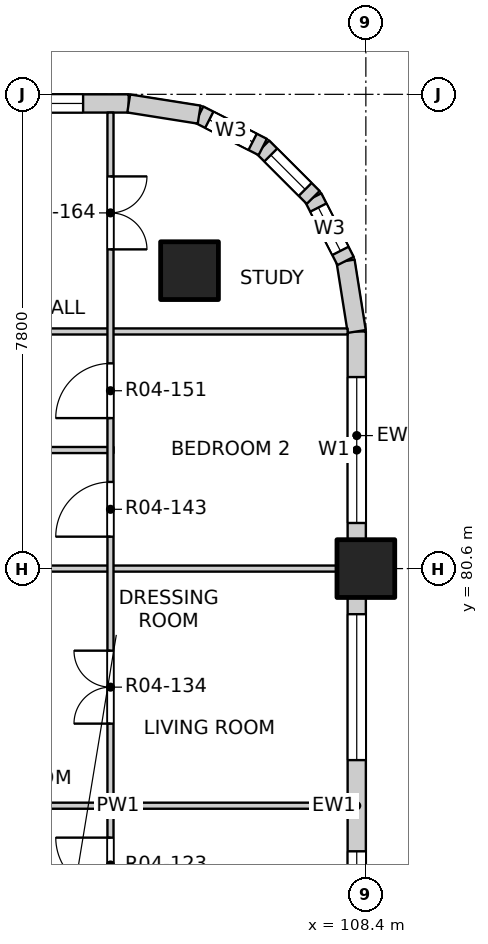
"""IFC4 building model, lengths in metres.
Left out: names, types, materials, properties, quantities, classifications, styles, units other than length and angle.
Written with IfcOpenShell. Run it as: python <this file> out.ifc"""

import sys

from ifc_helpers import new_model, si_unit, direction, frame, frame_2d, origin, origin_2d, place, context, subcontext, project, spatial, rectangle, extrude, element, fill, save


model = new_model("IFC4")
c1 = context("Model", 3, precision=1e-05, world=origin(), true_north=direction((0.0, 1.0)))
c2 = subcontext(c1, "Body", "Model", "MODEL_VIEW")
j1 = project(units=[si_unit("LENGTHUNIT", "METRE"), si_unit("PLANEANGLEUNIT", "RADIAN")], contexts=[c1])
p1 = place(None, origin())
s1 = spatial("IfcSite", under=j1, at=p1, CompositionType="ELEMENT")
p2 = place(p1, origin())
s2 = spatial("IfcBuilding", under=s1, at=p2, CompositionType="ELEMENT")
p3 = place(p2, frame((0.0, 0.0, 58.0)))
s3 = spatial("IfcBuildingStorey", under=s2, at=p3, CompositionType="ELEMENT", Elevation=58.0)
for number, where, z_axis, x_axis in (
    (1, (105.5, 85.5, -0.25), (0.0, 0.0, 1.0), (1.0, 0.0, 0.0)),
    (2, (108.4, 80.6, -0.25), (0.0, 0.0, 1.0), (1.0, 0.0, 0.0)),
):
    element("IfcColumn", number, at=place(p3, frame(where, z_axis=z_axis, x_axis=x_axis)), inside=s3, PredefinedType="COLUMN", context=c2, shape_type="SweptSolid", body=[
        extrude(rectangle(XDim=0.95, YDim=0.95, at=origin_2d()), origin(), (0.0, 0.0, 1.0), 3.4),
    ])
p4 = place(p3, frame((108.25, 73.275, 0.0), z_axis=(0.0, 0.0, 1.0), x_axis=(0.0, 1.0, 0.0)))
e3 = element("IfcWall", 3, at=p4, inside=s3, PredefinedType="SOLIDWALL", context=c2, shape_type="SweptSolid", body=[
    extrude(rectangle(XDim=6.85, YDim=0.3, at=frame_2d((3.425, 0.0))), origin(), (0.0, 0.0, 1.0), 2.7),
])
p5 = place(p4, frame((0.275, 0.0, 0.9)))
e4 = element("IfcOpeningElement", 4, at=p5, cuts=e3, PredefinedType="OPENING", context=c2, shape_type="SweptSolid", body=[
    extrude(rectangle(XDim=2.4, YDim=1.8, at=frame_2d((1.2, 0.9))), frame((0.0, 0.16, 0.0), z_axis=(0.0, -1.0, 0.0), x_axis=(1.0, 0.0, 0.0)), (0.0, 0.0, 1.0), 0.32),
])
p6 = place(p4, frame((4.175, 0.0, 0.9)))
e5 = element("IfcOpeningElement", 5, at=p6, cuts=e3, PredefinedType="OPENING", context=c2, shape_type="SweptSolid", body=[
    extrude(rectangle(XDim=2.4, YDim=1.8, at=frame_2d((1.2, 0.9))), frame((0.0, 0.16, 0.0), z_axis=(0.0, -1.0, 0.0), x_axis=(1.0, 0.0, 0.0)), (0.0, 0.0, 1.0), 0.32),
])
p7 = place(p3, frame((108.25, 81.075, 0.0), z_axis=(0.0, 0.0, 1.0), x_axis=(0.0, 1.0, 0.0)))
e6 = element("IfcWall", 6, at=p7, inside=s3, PredefinedType="SOLIDWALL", context=c2, shape_type="SweptSolid", body=[
    extrude(rectangle(XDim=3.425, YDim=0.3, at=frame_2d((1.712, 0.0))), origin(), (0.0, 0.0, 1.0), 2.7),
])
p8 = place(p7, frame((0.275, 0.0, 0.9)))
e7 = element("IfcOpeningElement", 7, at=p8, cuts=e6, PredefinedType="OPENING", context=c2, shape_type="SweptSolid", body=[
    extrude(rectangle(XDim=2.4, YDim=1.8, at=frame_2d((1.2, 0.9))), frame((0.0, 0.16, 0.0), z_axis=(0.0, -1.0, 0.0), x_axis=(1.0, 0.0, 0.0)), (0.0, 0.0, 1.0), 0.32),
])
p9 = place(p3, frame((101.075, 88.25, 0.0), z_axis=(0.0, 0.0, 1.0), x_axis=(1.0, 0.0, 0.0)))
e8 = element("IfcWall", 8, at=p9, inside=s3, PredefinedType="SOLIDWALL", context=c2, shape_type="SweptSolid", body=[
    extrude(rectangle(XDim=3.425, YDim=0.3, at=frame_2d((1.712, 0.0))), origin(), (0.0, 0.0, 1.0), 2.7),
])
p10 = place(p9, frame((0.275, 0.0, 0.9)))
e9 = element("IfcOpeningElement", 9, at=p10, cuts=e8, PredefinedType="OPENING", context=c2, shape_type="SweptSolid", body=[
    extrude(rectangle(XDim=2.4, YDim=1.8, at=frame_2d((1.2, 0.9))), frame((0.0, 0.16, 0.0), z_axis=(0.0, -1.0, 0.0), x_axis=(1.0, 0.0, 0.0)), (0.0, 0.0, 1.0), 0.32),
])
p11 = place(p3, frame((108.25, 84.5, 0.0), z_axis=(0.0, 0.0, 1.0), x_axis=(-0.156496880861, 0.987678452879, 0.0)))
e10 = element("IfcWall", 10, at=p11, inside=s3, PredefinedType="SOLIDWALL", context=c2, shape_type="SweptSolid", body=[
    extrude(rectangle(XDim=1.173, YDim=0.3, at=frame_2d((0.586, 0.0))), origin(), (0.0, 0.0, 1.0), 2.7),
])
p12 = place(p3, frame((108.066, 85.659, 0.0), z_axis=(0.0, 0.0, 1.0), x_axis=(-0.454025524128, 0.890988677504, 0.0)))
e11 = element("IfcWall", 11, at=p12, inside=s3, PredefinedType="SOLIDWALL", context=c2, shape_type="SweptSolid", body=[
    extrude(rectangle(XDim=1.173, YDim=0.3, at=frame_2d((0.587, 0.0))), origin(), (0.0, 0.0, 1.0), 2.7),
])
p13 = place(p12, frame((0.187, 0.0, 0.9)))
e12 = element("IfcOpeningElement", 12, at=p13, cuts=e11, PredefinedType="OPENING", context=c2, shape_type="SweptSolid", body=[
    extrude(rectangle(XDim=0.8, YDim=1.2, at=frame_2d((0.4, 0.6))), frame((0.0, 0.16, 0.0), z_axis=(0.0, -1.0, 0.0), x_axis=(1.0, 0.0, 0.0)), (0.0, 0.0, 1.0), 0.32),
])
p14 = place(p3, frame((107.534, 86.704, 0.0), z_axis=(0.0, 0.0, 1.0), x_axis=(-0.707106781187, 0.707106781187, 0.0)))
e13 = element("IfcWall", 13, at=p14, inside=s3, PredefinedType="SOLIDWALL", context=c2, shape_type="SweptSolid", body=[
    extrude(rectangle(XDim=1.173, YDim=0.3, at=frame_2d((0.586, 0.0))), origin(), (0.0, 0.0, 1.0), 2.7),
])
p15 = place(p14, frame((0.187, 0.0, 0.9)))
e14 = element("IfcOpeningElement", 14, at=p15, cuts=e13, PredefinedType="OPENING", context=c2, shape_type="SweptSolid", body=[
    extrude(rectangle(XDim=0.8, YDim=1.2, at=frame_2d((0.4, 0.6))), frame((0.0, 0.16, 0.0), z_axis=(0.0, -1.0, 0.0), x_axis=(1.0, 0.0, 0.0)), (0.0, 0.0, 1.0), 0.32),
])
p16 = place(p3, frame((106.704, 87.534, 0.0), z_axis=(0.0, 0.0, 1.0), x_axis=(-0.890988677504, 0.454025524128, 0.0)))
e15 = element("IfcWall", 15, at=p16, inside=s3, PredefinedType="SOLIDWALL", context=c2, shape_type="SweptSolid", body=[
    extrude(rectangle(XDim=1.173, YDim=0.3, at=frame_2d((0.587, 0.0))), origin(), (0.0, 0.0, 1.0), 2.7),
])
p17 = place(p16, frame((0.187, 0.0, 0.9)))
e16 = element("IfcOpeningElement", 16, at=p17, cuts=e15, PredefinedType="OPENING", context=c2, shape_type="SweptSolid", body=[
    extrude(rectangle(XDim=0.8, YDim=1.2, at=frame_2d((0.4, 0.6))), frame((0.0, 0.16, 0.0), z_axis=(0.0, -1.0, 0.0), x_axis=(1.0, 0.0, 0.0)), (0.0, 0.0, 1.0), 0.32),
])
p18 = place(p3, frame((105.659, 88.066, 0.0), z_axis=(0.0, 0.0, 1.0), x_axis=(-0.987678452879, 0.156496880861, 0.0)))
e17 = element("IfcWall", 17, at=p18, inside=s3, PredefinedType="SOLIDWALL", context=c2, shape_type="SweptSolid", body=[
    extrude(rectangle(XDim=1.173, YDim=0.3, at=frame_2d((0.586, 0.0))), origin(), (0.0, 0.0, 1.0), 2.7),
])
p19 = place(p3, frame((100.55, 76.7, 0.0), z_axis=(0.0, 0.0, 1.0), x_axis=(1.0, 0.0, 0.0)))
e18 = element("IfcWall", 18, at=p19, inside=s3, PredefinedType="PARTITIONING", context=c2, shape_type="SweptSolid", body=[
    extrude(rectangle(XDim=7.55, YDim=0.1, at=frame_2d((3.775, 0.0))), origin(), (0.0, 0.0, 1.0), 3.15),
])
p20 = place(p3, frame((100.55, 80.6, 0.0), z_axis=(0.0, 0.0, 1.0), x_axis=(1.0, 0.0, 0.0)))
e19 = element("IfcWall", 19, at=p20, inside=s3, PredefinedType="PARTITIONING", context=c2, shape_type="SweptSolid", body=[
    extrude(rectangle(XDim=7.55, YDim=0.1, at=frame_2d((3.775, 0.0))), origin(), (0.0, 0.0, 1.0), 2.55),
])
p21 = place(p3, frame((100.55, 82.55, 0.0), z_axis=(0.0, 0.0, 1.0), x_axis=(1.0, 0.0, 0.0)))
e20 = element("IfcWall", 20, at=p21, inside=s3, PredefinedType="PARTITIONING", context=c2, shape_type="SweptSolid", body=[
    extrude(rectangle(XDim=3.7, YDim=0.1, at=frame_2d((1.85, 0.0))), origin(), (0.0, 0.0, 1.0), 3.15),
])
p22 = place(p3, frame((96.6, 84.5, 0.0), z_axis=(0.0, 0.0, 1.0), x_axis=(1.0, 0.0, 0.0)))
e21 = element("IfcWall", 21, at=p22, inside=s3, PredefinedType="PARTITIONING", context=c2, shape_type="SweptSolid", body=[
    extrude(rectangle(XDim=11.5, YDim=0.1, at=frame_2d((5.75, 0.0))), origin(), (0.0, 0.0, 1.0), 3.15),
])
p23 = place(p22, frame((2.635, 0.0, 0.0)))
e22 = element("IfcOpeningElement", 22, at=p23, cuts=e21, PredefinedType="OPENING", context=c2, shape_type="SweptSolid", body=[
    extrude(rectangle(XDim=0.9, YDim=2.1, at=frame_2d((0.45, 1.05))), frame((0.0, 0.06, 0.0), z_axis=(0.0, -1.0, 0.0), x_axis=(1.0, 0.0, 0.0)), (0.0, 0.0, 1.0), 0.12),
])
p24 = place(p3, frame((104.2, 41.9, 0.0), z_axis=(0.0, 0.0, 1.0), x_axis=(0.0, 1.0, 0.0)))
e23 = element("IfcWall", 23, at=p24, inside=s3, PredefinedType="PARTITIONING", context=c2, shape_type="SweptSolid", body=[
    extrude(rectangle(XDim=46.2, YDim=0.1, at=frame_2d((23.1, 0.0))), origin(), (0.0, 0.0, 1.0), 3.15),
])
p25 = place(p24, frame((1.05, 0.0, 0.0)))
e24 = element("IfcOpeningElement", 24, at=p25, cuts=e23, PredefinedType="OPENING", context=c2, shape_type="SweptSolid", body=[
    extrude(rectangle(XDim=1.2, YDim=2.1, at=frame_2d((0.6, 1.05))), frame((0.0, 0.06, 0.0), z_axis=(0.0, -1.0, 0.0), x_axis=(1.0, 0.0, 0.0)), (0.0, 0.0, 1.0), 0.12),
])
p26 = place(p24, frame((4.125, 0.0, 0.0)))
e25 = element("IfcOpeningElement", 25, at=p26, cuts=e23, PredefinedType="OPENING", context=c2, shape_type="SweptSolid", body=[
    extrude(rectangle(XDim=0.9, YDim=2.1, at=frame_2d((0.45, 1.05))), frame((0.0, 0.06, 0.0), z_axis=(0.0, -1.0, 0.0), x_axis=(1.0, 0.0, 0.0)), (0.0, 0.0, 1.0), 0.12),
])
p27 = place(p24, frame((6.075, 0.0, 0.0)))
e26 = element("IfcOpeningElement", 26, at=p27, cuts=e23, PredefinedType="OPENING", context=c2, shape_type="SweptSolid", body=[
    extrude(rectangle(XDim=0.9, YDim=2.1, at=frame_2d((0.45, 1.05))), frame((0.0, 0.06, 0.0), z_axis=(0.0, -1.0, 0.0), x_axis=(1.0, 0.0, 0.0)), (0.0, 0.0, 1.0), 0.12),
])
p28 = place(p24, frame((8.025, 0.0, 0.0)))
e27 = element("IfcOpeningElement", 27, at=p28, cuts=e23, PredefinedType="OPENING", context=c2, shape_type="SweptSolid", body=[
    extrude(rectangle(XDim=0.9, YDim=2.1, at=frame_2d((0.45, 1.05))), frame((0.0, 0.06, 0.0), z_axis=(0.0, -1.0, 0.0), x_axis=(1.0, 0.0, 0.0)), (0.0, 0.0, 1.0), 0.12),
])
p29 = place(p24, frame((9.975, 0.0, 0.0)))
e28 = element("IfcOpeningElement", 28, at=p29, cuts=e23, PredefinedType="OPENING", context=c2, shape_type="SweptSolid", body=[
    extrude(rectangle(XDim=0.9, YDim=2.1, at=frame_2d((0.45, 1.05))), frame((0.0, 0.06, 0.0), z_axis=(0.0, -1.0, 0.0), x_axis=(1.0, 0.0, 0.0)), (0.0, 0.0, 1.0), 0.12),
])
p30 = place(p24, frame((12.75, 0.0, 0.0)))
e29 = element("IfcOpeningElement", 29, at=p30, cuts=e23, PredefinedType="OPENING", context=c2, shape_type="SweptSolid", body=[
    extrude(rectangle(XDim=1.2, YDim=2.1, at=frame_2d((0.6, 1.05))), frame((0.0, 0.06, 0.0), z_axis=(0.0, -1.0, 0.0), x_axis=(1.0, 0.0, 0.0)), (0.0, 0.0, 1.0), 0.12),
])
p31 = place(p24, frame((15.825, 0.0, 0.0)))
e30 = element("IfcOpeningElement", 30, at=p31, cuts=e23, PredefinedType="OPENING", context=c2, shape_type="SweptSolid", body=[
    extrude(rectangle(XDim=0.9, YDim=2.1, at=frame_2d((0.45, 1.05))), frame((0.0, 0.06, 0.0), z_axis=(0.0, -1.0, 0.0), x_axis=(1.0, 0.0, 0.0)), (0.0, 0.0, 1.0), 0.12),
])
p32 = place(p24, frame((17.775, 0.0, 0.0)))
e31 = element("IfcOpeningElement", 31, at=p32, cuts=e23, PredefinedType="OPENING", context=c2, shape_type="SweptSolid", body=[
    extrude(rectangle(XDim=0.9, YDim=2.1, at=frame_2d((0.45, 1.05))), frame((0.0, 0.06, 0.0), z_axis=(0.0, -1.0, 0.0), x_axis=(1.0, 0.0, 0.0)), (0.0, 0.0, 1.0), 0.12),
])
p33 = place(p24, frame((20.55, 0.0, 0.0)))
e32 = element("IfcOpeningElement", 32, at=p33, cuts=e23, PredefinedType="OPENING", context=c2, shape_type="SweptSolid", body=[
    extrude(rectangle(XDim=1.2, YDim=2.1, at=frame_2d((0.6, 1.05))), frame((0.0, 0.06, 0.0), z_axis=(0.0, -1.0, 0.0), x_axis=(1.0, 0.0, 0.0)), (0.0, 0.0, 1.0), 0.12),
])
p34 = place(p24, frame((24.45, 0.0, 0.0)))
e33 = element("IfcOpeningElement", 33, at=p34, cuts=e23, PredefinedType="OPENING", context=c2, shape_type="SweptSolid", body=[
    extrude(rectangle(XDim=1.2, YDim=2.1, at=frame_2d((0.6, 1.05))), frame((0.0, 0.06, 0.0), z_axis=(0.0, -1.0, 0.0), x_axis=(1.0, 0.0, 0.0)), (0.0, 0.0, 1.0), 0.12),
])
p35 = place(p24, frame((27.525, 0.0, 0.0)))
e34 = element("IfcOpeningElement", 34, at=p35, cuts=e23, PredefinedType="OPENING", context=c2, shape_type="SweptSolid", body=[
    extrude(rectangle(XDim=0.9, YDim=2.1, at=frame_2d((0.45, 1.05))), frame((0.0, 0.06, 0.0), z_axis=(0.0, -1.0, 0.0), x_axis=(1.0, 0.0, 0.0)), (0.0, 0.0, 1.0), 0.12),
])
p36 = place(p24, frame((29.475, 0.0, 0.0)))
e35 = element("IfcOpeningElement", 35, at=p36, cuts=e23, PredefinedType="OPENING", context=c2, shape_type="SweptSolid", body=[
    extrude(rectangle(XDim=0.9, YDim=2.1, at=frame_2d((0.45, 1.05))), frame((0.0, 0.06, 0.0), z_axis=(0.0, -1.0, 0.0), x_axis=(1.0, 0.0, 0.0)), (0.0, 0.0, 1.0), 0.12),
])
p37 = place(p24, frame((31.425, 0.0, 0.0)))
e36 = element("IfcOpeningElement", 36, at=p37, cuts=e23, PredefinedType="OPENING", context=c2, shape_type="SweptSolid", body=[
    extrude(rectangle(XDim=0.9, YDim=2.1, at=frame_2d((0.45, 1.05))), frame((0.0, 0.06, 0.0), z_axis=(0.0, -1.0, 0.0), x_axis=(1.0, 0.0, 0.0)), (0.0, 0.0, 1.0), 0.12),
])
p38 = place(p24, frame((33.375, 0.0, 0.0)))
e37 = element("IfcOpeningElement", 37, at=p38, cuts=e23, PredefinedType="OPENING", context=c2, shape_type="SweptSolid", body=[
    extrude(rectangle(XDim=0.9, YDim=2.1, at=frame_2d((0.45, 1.05))), frame((0.0, 0.06, 0.0), z_axis=(0.0, -1.0, 0.0), x_axis=(1.0, 0.0, 0.0)), (0.0, 0.0, 1.0), 0.12),
])
p39 = place(p24, frame((36.15, 0.0, 0.0)))
e38 = element("IfcOpeningElement", 38, at=p39, cuts=e23, PredefinedType="OPENING", context=c2, shape_type="SweptSolid", body=[
    extrude(rectangle(XDim=1.2, YDim=2.1, at=frame_2d((0.6, 1.05))), frame((0.0, 0.06, 0.0), z_axis=(0.0, -1.0, 0.0), x_axis=(1.0, 0.0, 0.0)), (0.0, 0.0, 1.0), 0.12),
])
p40 = place(p24, frame((39.225, 0.0, 0.0)))
e39 = element("IfcOpeningElement", 39, at=p40, cuts=e23, PredefinedType="OPENING", context=c2, shape_type="SweptSolid", body=[
    extrude(rectangle(XDim=0.9, YDim=2.1, at=frame_2d((0.45, 1.05))), frame((0.0, 0.06, 0.0), z_axis=(0.0, -1.0, 0.0), x_axis=(1.0, 0.0, 0.0)), (0.0, 0.0, 1.0), 0.12),
])
p41 = place(p24, frame((41.175, 0.0, 0.0)))
e40 = element("IfcOpeningElement", 40, at=p41, cuts=e23, PredefinedType="OPENING", context=c2, shape_type="SweptSolid", body=[
    extrude(rectangle(XDim=0.9, YDim=2.1, at=frame_2d((0.45, 1.05))), frame((0.0, 0.06, 0.0), z_axis=(0.0, -1.0, 0.0), x_axis=(1.0, 0.0, 0.0)), (0.0, 0.0, 1.0), 0.12),
])
p42 = place(p24, frame((43.95, 0.0, 0.0)))
e41 = element("IfcOpeningElement", 41, at=p42, cuts=e23, PredefinedType="OPENING", context=c2, shape_type="SweptSolid", body=[
    extrude(rectangle(XDim=1.2, YDim=2.1, at=frame_2d((0.6, 1.05))), frame((0.0, 0.06, 0.0), z_axis=(0.0, -1.0, 0.0), x_axis=(1.0, 0.0, 0.0)), (0.0, 0.0, 1.0), 0.12),
])
p43 = place(p5, origin())
e42 = element("IfcWindow", 42, at=p43, inside=s3, PartitioningType="DOUBLE_PANEL_VERTICAL", PredefinedType="WINDOW", context=c2, shape_type="SweptSolid", body=[
    extrude(rectangle(XDim=2.4, YDim=1.8, at=frame_2d((1.2, 0.9))), frame((0.0, 0.03, 0.0), z_axis=(0.0, -1.0, 0.0), x_axis=(1.0, 0.0, 0.0)), (0.0, 0.0, 1.0), 0.06),
])
fill(e4, e42)
p44 = place(p6, origin())
e43 = element("IfcWindow", 43, at=p44, inside=s3, PartitioningType="DOUBLE_PANEL_VERTICAL", PredefinedType="WINDOW", context=c2, shape_type="SweptSolid", body=[
    extrude(rectangle(XDim=2.4, YDim=1.8, at=frame_2d((1.2, 0.9))), frame((0.0, 0.03, 0.0), z_axis=(0.0, -1.0, 0.0), x_axis=(1.0, 0.0, 0.0)), (0.0, 0.0, 1.0), 0.06),
])
fill(e5, e43)
p45 = place(p8, origin())
e44 = element("IfcWindow", 44, at=p45, inside=s3, PartitioningType="DOUBLE_PANEL_VERTICAL", PredefinedType="WINDOW", context=c2, shape_type="SweptSolid", body=[
    extrude(rectangle(XDim=2.4, YDim=1.8, at=frame_2d((1.2, 0.9))), frame((0.0, 0.03, 0.0), z_axis=(0.0, -1.0, 0.0), x_axis=(1.0, 0.0, 0.0)), (0.0, 0.0, 1.0), 0.06),
])
fill(e7, e44)
p46 = place(p10, origin())
e45 = element("IfcWindow", 45, at=p46, inside=s3, PartitioningType="DOUBLE_PANEL_VERTICAL", PredefinedType="WINDOW", context=c2, shape_type="SweptSolid", body=[
    extrude(rectangle(XDim=2.4, YDim=1.8, at=frame_2d((1.2, 0.9))), frame((0.0, 0.03, 0.0), z_axis=(0.0, -1.0, 0.0), x_axis=(1.0, 0.0, 0.0)), (0.0, 0.0, 1.0), 0.06),
])
fill(e9, e45)
p47 = place(p13, origin())
e46 = element("IfcWindow", 46, at=p47, inside=s3, PartitioningType="SINGLE_PANEL", PredefinedType="WINDOW", context=c2, shape_type="SweptSolid", body=[
    extrude(rectangle(XDim=0.8, YDim=1.2, at=frame_2d((0.4, 0.6))), frame((0.0, 0.03, 0.0), z_axis=(0.0, -1.0, 0.0), x_axis=(1.0, 0.0, 0.0)), (0.0, 0.0, 1.0), 0.06),
])
fill(e12, e46)
p48 = place(p15, origin())
e47 = element("IfcWindow", 47, at=p48, inside=s3, PartitioningType="SINGLE_PANEL", PredefinedType="WINDOW", context=c2, shape_type="SweptSolid", body=[
    extrude(rectangle(XDim=0.8, YDim=1.2, at=frame_2d((0.4, 0.6))), frame((0.0, 0.03, 0.0), z_axis=(0.0, -1.0, 0.0), x_axis=(1.0, 0.0, 0.0)), (0.0, 0.0, 1.0), 0.06),
])
fill(e14, e47)
p49 = place(p17, origin())
e48 = element("IfcWindow", 48, at=p49, inside=s3, PartitioningType="SINGLE_PANEL", PredefinedType="WINDOW", context=c2, shape_type="SweptSolid", body=[
    extrude(rectangle(XDim=0.8, YDim=1.2, at=frame_2d((0.4, 0.6))), frame((0.0, 0.03, 0.0), z_axis=(0.0, -1.0, 0.0), x_axis=(1.0, 0.0, 0.0)), (0.0, 0.0, 1.0), 0.06),
])
fill(e16, e48)
p50 = place(p38, origin())
e49 = element("IfcDoor", 49, at=p50, inside=s3, OperationType="SINGLE_SWING_RIGHT", PredefinedType="DOOR", context=c2, shape_type="SweptSolid", body=[
    extrude(rectangle(XDim=0.9, YDim=2.1, at=frame_2d((0.45, 1.05))), frame((0.0, 0.025, 0.0), z_axis=(0.0, -1.0, 0.0), x_axis=(1.0, 0.0, 0.0)), (0.0, 0.0, 1.0), 0.05),
])
fill(e37, e49)
p51 = place(p39, origin())
e50 = element("IfcDoor", 50, at=p51, inside=s3, OperationType="DOUBLE_DOOR_SINGLE_SWING", PredefinedType="DOOR", context=c2, shape_type="SweptSolid", body=[
    extrude(rectangle(XDim=1.2, YDim=2.1, at=frame_2d((0.6, 1.05))), frame((0.0, 0.025, 0.0), z_axis=(0.0, -1.0, 0.0), x_axis=(1.0, 0.0, 0.0)), (0.0, 0.0, 1.0), 0.05),
])
fill(e38, e50)
p52 = place(p40, origin())
e51 = element("IfcDoor", 51, at=p52, inside=s3, OperationType="SINGLE_SWING_LEFT", PredefinedType="DOOR", context=c2, shape_type="SweptSolid", body=[
    extrude(rectangle(XDim=0.9, YDim=2.1, at=frame_2d((0.45, 1.05))), frame((0.0, 0.025, 0.0), z_axis=(0.0, -1.0, 0.0), x_axis=(1.0, 0.0, 0.0)), (0.0, 0.0, 1.0), 0.05),
])
fill(e39, e51)
p53 = place(p41, origin())
e52 = element("IfcDoor", 52, at=p53, inside=s3, OperationType="SINGLE_SWING_LEFT", PredefinedType="DOOR", context=c2, shape_type="SweptSolid", body=[
    extrude(rectangle(XDim=0.9, YDim=2.1, at=frame_2d((0.45, 1.05))), frame((0.0, 0.025, 0.0), z_axis=(0.0, -1.0, 0.0), x_axis=(1.0, 0.0, 0.0)), (0.0, 0.0, 1.0), 0.05),
])
fill(e40, e52)
p54 = place(p42, origin())
e53 = element("IfcDoor", 53, at=p54, inside=s3, OperationType="DOUBLE_DOOR_SINGLE_SWING", PredefinedType="DOOR", context=c2, shape_type="SweptSolid", body=[
    extrude(rectangle(XDim=1.2, YDim=2.1, at=frame_2d((0.6, 1.05))), frame((0.0, 0.025, 0.0), z_axis=(0.0, -1.0, 0.0), x_axis=(1.0, 0.0, 0.0)), (0.0, 0.0, 1.0), 0.05),
])
fill(e41, e53)
save(model, sys.argv[1])
